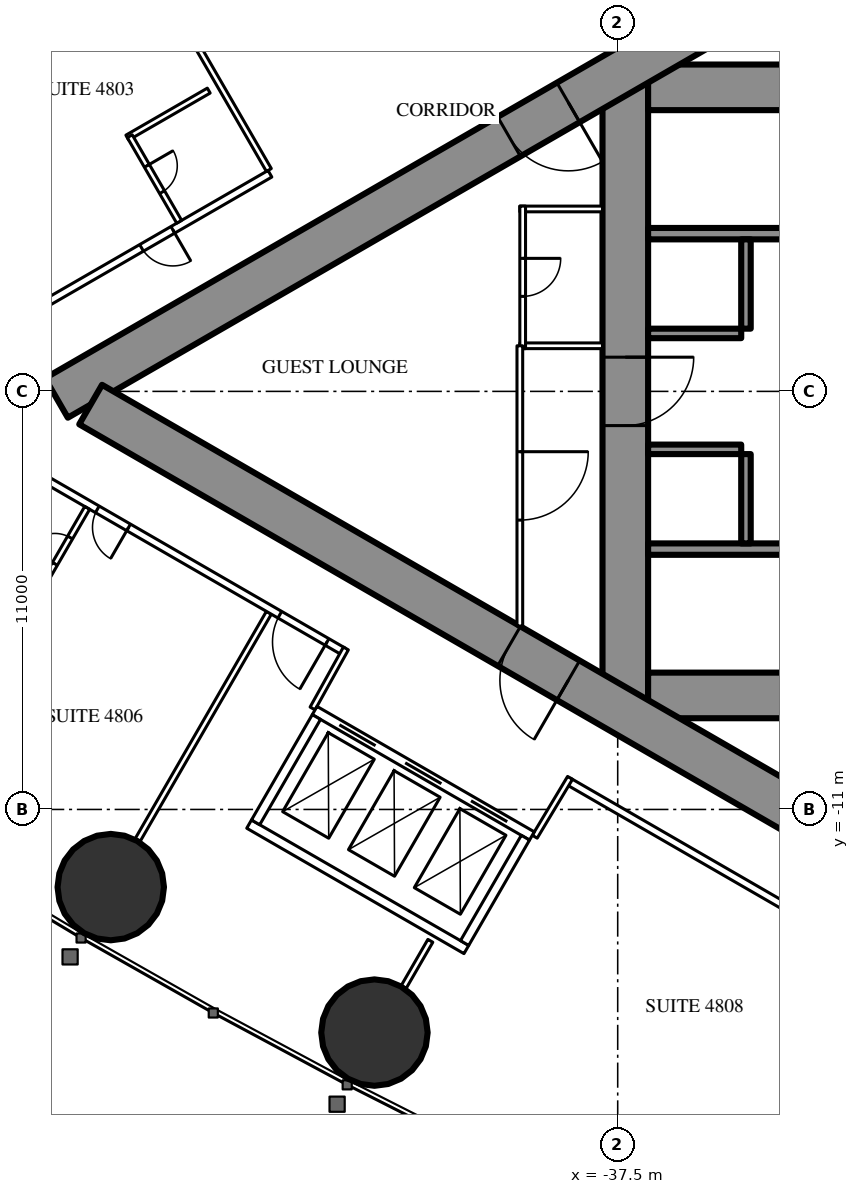
"""IFC4 building model, lengths in metres.
Left out: names, types, materials, properties, quantities, classifications, styles, units other than length and angle.
Written with IfcOpenShell. Run it as: python <this file> out.ifc"""

import sys

from ifc_helpers import new_model, si_unit, direction, frame, frame_2d, origin, origin_2d, place, context, subcontext, project, spatial, rectangle, circle, extrude, element, fill, save


model = new_model("IFC4")
c1 = context("Model", 3, precision=1e-05, world=origin(), true_north=direction((0.0, 1.0)))
c2 = subcontext(c1, "Body", "Model", "MODEL_VIEW")
j1 = project(units=[si_unit("LENGTHUNIT", "METRE"), si_unit("PLANEANGLEUNIT", "RADIAN")], contexts=[c1])
p1 = place(None, origin())
s1 = spatial("IfcSite", under=j1, at=p1, CompositionType="ELEMENT")
p2 = place(p1, origin())
s2 = spatial("IfcBuilding", under=s1, at=p2, CompositionType="ELEMENT")
p3 = place(p2, frame((0.0, 0.0, 180.8)))
s3 = spatial("IfcBuildingStorey", under=s2, at=p3, CompositionType="ELEMENT", Elevation=180.8)
for number, where, z_axis, x_axis in (
    (1, (-50.839, -13.043, 0.0), (0.0, 0.0, 1.0), (1.0, 0.0, 0.0)),
    (2, (-43.9, -16.871, 0.0), (0.0, 0.0, 1.0), (1.0, 0.0, 0.0)),
):
    element("IfcColumn", number, at=place(p3, frame(where, z_axis=z_axis, x_axis=x_axis)), inside=s3, PredefinedType="COLUMN", context=c2, shape_type="SweptSolid", body=[
        extrude(circle(Radius=1.4, at=origin_2d()), origin(), (0.0, 0.0, 1.0), 3.5),
    ])
p4 = place(p3, frame((-37.3, 8.6, 0.0), z_axis=(0.0, 0.0, 1.0), x_axis=(0.0, -1.0, 0.0)))
e3 = element("IfcWall", 3, at=p4, inside=s3, PredefinedType="SHEAR", context=c2, shape_type="SweptSolid", body=[
    extrude(rectangle(XDim=17.2, YDim=1.2, at=frame_2d((8.6, 0.0))), origin(), (0.0, 0.0, 1.0), 3.5),
])
p5 = place(p4, frame((7.7, 0.0, 0.0)))
e4 = element("IfcOpeningElement", 4, at=p5, cuts=e3, PredefinedType="OPENING", context=c2, shape_type="SweptSolid", body=[
    extrude(rectangle(XDim=1.8, YDim=2.2, at=frame_2d((0.9, 1.1))), frame((0.0, 0.61, 0.0), z_axis=(0.0, -1.0, 0.0), x_axis=(1.0, 0.0, 0.0)), (0.0, 0.0, 1.0), 1.22),
])
p6 = place(p3, frame((-28.3, 8.0, 0.0), z_axis=(0.0, 0.0, 1.0), x_axis=(-1.0, 0.0, 0.0)))
e5 = element("IfcWall", 5, at=p6, inside=s3, PredefinedType="SHEAR", context=c2, shape_type="SweptSolid", body=[
    extrude(rectangle(XDim=8.4, YDim=1.2, at=frame_2d((4.2, 0.0))), origin(), (0.0, 0.0, 1.0), 3.5),
])
p7 = place(p6, frame((0.25, 0.0, 0.0)))
e6 = element("IfcOpeningElement", 6, at=p7, cuts=e5, PredefinedType="OPENING", context=c2, shape_type="SweptSolid", body=[
    extrude(rectangle(XDim=1.0, YDim=2.2, at=frame_2d((0.5, 1.1))), frame((0.0, 0.61, 0.0), z_axis=(0.0, -1.0, 0.0), x_axis=(1.0, 0.0, 0.0)), (0.0, 0.0, 1.0), 1.22),
])
p8 = place(p3, frame((-28.3, -8.0, 0.0), z_axis=(0.0, 0.0, 1.0), x_axis=(-1.0, 0.0, 0.0)))
e7 = element("IfcWall", 7, at=p8, inside=s3, PredefinedType="SHEAR", context=c2, shape_type="SweptSolid", body=[
    extrude(rectangle(XDim=8.4, YDim=1.2, at=frame_2d((4.2, 0.0))), origin(), (0.0, 0.0, 1.0), 3.5),
])
p9 = place(p8, frame((0.25, 0.0, 0.0)))
e8 = element("IfcOpeningElement", 8, at=p9, cuts=e7, PredefinedType="OPENING", context=c2, shape_type="SweptSolid", body=[
    extrude(rectangle(XDim=1.0, YDim=2.2, at=frame_2d((0.5, 1.1))), frame((0.0, 0.61, 0.0), z_axis=(0.0, -1.0, 0.0), x_axis=(1.0, 0.0, 0.0)), (0.0, 0.0, 1.0), 1.22),
])
for number, where, z_axis, x_axis in (
    (9, (-28.3, 4.15, 0.0), (0.0, 0.0, 1.0), (-1.0, 0.0, 0.0)),
    (10, (-28.3, -4.15, 0.0), (0.0, 0.0, 1.0), (-1.0, 0.0, 0.0)),
):
    element("IfcWall", number, at=place(p3, frame(where, z_axis=z_axis, x_axis=x_axis)), inside=s3, PredefinedType="SHEAR", context=c2, shape_type="SweptSolid", body=[
        extrude(rectangle(XDim=8.4, YDim=0.3, at=frame_2d((4.2, 0.0))), origin(), (0.0, 0.0, 1.0), 3.5),
    ])
p10 = place(p3, frame((-34.125, 4.0, 0.0), z_axis=(0.0, 0.0, 1.0), x_axis=(0.0, -1.0, 0.0)))
e11 = element("IfcWall", 11, at=p10, inside=s3, PredefinedType="SHEAR", context=c2, shape_type="SweptSolid", body=[
    extrude(rectangle(XDim=2.35, YDim=0.25, at=frame_2d((1.175, 0.0))), origin(), (0.0, 0.0, 1.0), 3.5),
])
p11 = place(p3, frame((-34.25, 1.525, 0.0), z_axis=(0.0, 0.0, 1.0), x_axis=(-1.0, 0.0, 0.0)))
e12 = element("IfcWall", 12, at=p11, inside=s3, PredefinedType="SHEAR", context=c2, shape_type="SweptSolid", body=[
    extrude(rectangle(XDim=2.45, YDim=0.25, at=frame_2d((1.225, 0.0))), origin(), (0.0, 0.0, 1.0), 3.5),
])
p12 = place(p3, frame((-34.125, -1.65, 0.0), z_axis=(0.0, 0.0, 1.0), x_axis=(0.0, -1.0, 0.0)))
e13 = element("IfcWall", 13, at=p12, inside=s3, PredefinedType="SHEAR", context=c2, shape_type="SweptSolid", body=[
    extrude(rectangle(XDim=2.35, YDim=0.25, at=frame_2d((1.175, 0.0))), origin(), (0.0, 0.0, 1.0), 3.5),
])
p13 = place(p3, frame((-34.25, -1.525, 0.0), z_axis=(0.0, 0.0, 1.0), x_axis=(-1.0, 0.0, 0.0)))
e14 = element("IfcWall", 14, at=p13, inside=s3, PredefinedType="SHEAR", context=c2, shape_type="SweptSolid", body=[
    extrude(rectangle(XDim=2.45, YDim=0.25, at=frame_2d((1.225, 0.0))), origin(), (0.0, 0.0, 1.0), 3.5),
])
p14 = place(p3, frame((-27.2, 14.3, 0.0), z_axis=(0.0, 0.0, 1.0), x_axis=(-0.866026593062, -0.499997940104, 0.0)))
e15 = element("IfcWall", 15, at=p14, inside=s3, PredefinedType="SHEAR", context=c2, shape_type="SweptSolid", body=[
    extrude(rectangle(XDim=28.946, YDim=1.2, at=frame_2d((14.473, 0.0))), origin(), (0.0, 0.0, 1.0), 3.5),
])
p15 = place(p14, frame((4.6, 0.0, 0.0)))
e16 = element("IfcOpeningElement", 16, at=p15, cuts=e15, PredefinedType="OPENING", context=c2, shape_type="SweptSolid", body=[
    extrude(rectangle(XDim=1.0, YDim=2.2, at=frame_2d((0.5, 1.1))), frame((0.0, 0.61, 0.0), z_axis=(0.0, -1.0, 0.0), x_axis=(1.0, 0.0, 0.0)), (0.0, 0.0, 1.0), 1.22),
])
p16 = place(p14, frame((13.395, 0.0, 0.0)))
e17 = element("IfcOpeningElement", 17, at=p16, cuts=e15, PredefinedType="OPENING", context=c2, shape_type="SweptSolid", body=[
    extrude(rectangle(XDim=1.8, YDim=2.2, at=frame_2d((0.9, 1.1))), frame((0.0, 0.61, 0.0), z_axis=(0.0, -1.0, 0.0), x_axis=(1.0, 0.0, 0.0)), (0.0, 0.0, 1.0), 1.22),
])
p17 = place(p3, frame((-27.2, -14.3, 0.0), z_axis=(0.0, 0.0, 1.0), x_axis=(-0.866024021859, 0.500002393557, 0.0)))
e18 = element("IfcWall", 18, at=p17, inside=s3, PredefinedType="SHEAR", context=c2, shape_type="SweptSolid", body=[
    extrude(rectangle(XDim=27.907, YDim=1.2, at=frame_2d((13.954, 0.0))), origin(), (0.0, 0.0, 1.0), 3.5),
])
p18 = place(p17, frame((4.6, 0.0, 0.0)))
e19 = element("IfcOpeningElement", 19, at=p18, cuts=e18, PredefinedType="OPENING", context=c2, shape_type="SweptSolid", body=[
    extrude(rectangle(XDim=1.0, YDim=2.2, at=frame_2d((0.5, 1.1))), frame((0.0, 0.61, 0.0), z_axis=(0.0, -1.0, 0.0), x_axis=(1.0, 0.0, 0.0)), (0.0, 0.0, 1.0), 1.22),
])
p19 = place(p17, frame((13.395, 0.0, 0.0)))
e20 = element("IfcOpeningElement", 20, at=p19, cuts=e18, PredefinedType="OPENING", context=c2, shape_type="SweptSolid", body=[
    extrude(rectangle(XDim=1.8, YDim=2.2, at=frame_2d((0.9, 1.1))), frame((0.0, 0.61, 0.0), z_axis=(0.0, -1.0, 0.0), x_axis=(1.0, 0.0, 0.0)), (0.0, 0.0, 1.0), 1.22),
])
for number, where, z_axis, x_axis in (
    (21, (-46.679, 5.825, 0.0), (0.0, 0.0, 1.0), (-0.5, 0.866, 0.0)),
    (22, (-46.679, -5.825, 0.0), (0.0, 0.0, 1.0), (-0.5, -0.866, 0.0)),
):
    element("IfcWall", number, at=place(p3, frame(where, z_axis=z_axis, x_axis=x_axis)), inside=s3, PredefinedType="PARTITIONING", context=c2, shape_type="SweptSolid", body=[
        extrude(rectangle(XDim=6.911, YDim=0.15, at=frame_2d((3.456, 0.0))), origin(), (0.0, 0.0, 1.0), 2.3),
    ])
p20 = place(p3, frame((-42.429, -14.457, 0.0), z_axis=(0.0, 0.0, 1.0), x_axis=(-0.5000578829, -0.865991982497, 0.0)))
e23 = element("IfcWall", 23, at=p20, inside=s3, PredefinedType="PARTITIONING", context=c2, shape_type="SweptSolid", body=[
    extrude(rectangle(XDim=1.407, YDim=0.15, at=frame_2d((0.704, 0.0))), origin(), (0.0, 0.0, 1.0), 3.25),
])
p21 = place(p3, frame((-27.86, -16.575, 0.0), z_axis=(0.0, 0.0, 1.0), x_axis=(-0.866027756871, 0.499995924312, 0.0)))
e24 = element("IfcWall", 24, at=p21, inside=s3, PredefinedType="PARTITIONING", context=c2, shape_type="SweptSolid", body=[
    extrude(rectangle(XDim=12.622, YDim=0.2, at=frame_2d((6.311, 0.0))), origin(), (0.0, 0.0, 1.0), 3.25),
])
p22 = place(p21, frame((3.75, 0.0, 0.0)))
e25 = element("IfcOpeningElement", 25, at=p22, cuts=e24, PredefinedType="OPENING", context=c2, shape_type="SweptSolid", body=[
    extrude(rectangle(XDim=0.95, YDim=2.2, at=frame_2d((0.475, 1.1))), frame((0.0, 0.11, 0.0), z_axis=(0.0, -1.0, 0.0), x_axis=(1.0, 0.0, 0.0)), (0.0, 0.0, 1.0), 0.22),
])
p23 = place(p3, frame((-44.715, -6.844, 0.0), z_axis=(0.0, 0.0, 1.0), x_axis=(-0.866025261224, 0.500000246922, 0.0)))
e26 = element("IfcWall", 26, at=p23, inside=s3, PredefinedType="PARTITIONING", context=c2, shape_type="SweptSolid", body=[
    extrude(rectangle(XDim=13.567, YDim=0.2, at=frame_2d((6.783, 0.0))), origin(), (0.0, 0.0, 1.0), 3.25),
])
p24 = place(p23, frame((10.579, 0.0, 0.0)))
e27 = element("IfcOpeningElement", 27, at=p24, cuts=e26, PredefinedType="OPENING", context=c2, shape_type="SweptSolid", body=[
    extrude(rectangle(XDim=0.95, YDim=2.2, at=frame_2d((0.475, 1.1))), frame((0.0, 0.11, 0.0), z_axis=(0.0, -1.0, 0.0), x_axis=(1.0, 0.0, 0.0)), (0.0, 0.0, 1.0), 0.22),
])
p25 = place(p23, frame((6.529, 0.0, 0.0)))
e28 = element("IfcOpeningElement", 28, at=p25, cuts=e26, PredefinedType="OPENING", context=c2, shape_type="SweptSolid", body=[
    extrude(rectangle(XDim=0.95, YDim=2.2, at=frame_2d((0.475, 1.1))), frame((0.0, 0.11, 0.0), z_axis=(0.0, -1.0, 0.0), x_axis=(1.0, 0.0, 0.0)), (0.0, 0.0, 1.0), 0.22),
])
p26 = place(p23, frame((0.5, 0.0, 0.0)))
e29 = element("IfcOpeningElement", 29, at=p26, cuts=e26, PredefinedType="OPENING", context=c2, shape_type="SweptSolid", body=[
    extrude(rectangle(XDim=1.435, YDim=2.2, at=frame_2d((0.718, 1.1))), frame((0.0, 0.11, 0.0), z_axis=(0.0, -1.0, 0.0), x_axis=(1.0, 0.0, 0.0)), (0.0, 0.0, 1.0), 0.22),
])
for number, where, z_axis, x_axis in (
    (30, (-39.683, -11.718, 0.0), (0.0, 0.0, 1.0), (0.514, 0.858, 0.0)),
    (31, (-44.652, -6.764, 0.0), (0.0, 0.0, 1.0), (-0.485, -0.874, 0.0)),
):
    element("IfcWall", number, at=place(p3, frame(where, z_axis=z_axis, x_axis=x_axis)), inside=s3, PredefinedType="PARTITIONING", context=c2, shape_type="SweptSolid", body=[
        extrude(rectangle(XDim=1.805, YDim=0.15, at=frame_2d((0.903, 0.0))), origin(), (0.0, 0.0, 1.0), 3.25),
    ])
p27 = place(p3, frame((-46.65, 5.726, 0.0), z_axis=(0.0, 0.0, 1.0), x_axis=(-0.866027963864, -0.499995565786, 0.0)))
e32 = element("IfcWall", 32, at=p27, inside=s3, PredefinedType="PARTITIONING", context=c2, shape_type="SweptSolid", body=[
    extrude(rectangle(XDim=11.452, YDim=0.2, at=frame_2d((5.726, 0.0))), origin(), (0.0, 0.0, 1.0), 3.25),
])
p28 = place(p27, frame((2.95, 0.0, 0.0)))
e33 = element("IfcOpeningElement", 33, at=p28, cuts=e32, PredefinedType="OPENING", context=c2, shape_type="SweptSolid", body=[
    extrude(rectangle(XDim=0.95, YDim=2.2, at=frame_2d((0.475, 1.1))), frame((0.0, 0.11, 0.0), z_axis=(0.0, -1.0, 0.0), x_axis=(1.0, 0.0, 0.0)), (0.0, 0.0, 1.0), 0.22),
])
p29 = place(p27, frame((8.344, 0.0, 0.0)))
e34 = element("IfcOpeningElement", 34, at=p29, cuts=e32, PredefinedType="OPENING", context=c2, shape_type="SweptSolid", body=[
    extrude(rectangle(XDim=0.95, YDim=2.2, at=frame_2d((0.475, 1.1))), frame((0.0, 0.11, 0.0), z_axis=(0.0, -1.0, 0.0), x_axis=(1.0, 0.0, 0.0)), (0.0, 0.0, 1.0), 0.22),
])
p30 = place(p3, frame((-48.26, 7.914, 0.0), z_axis=(0.0, 0.0, 1.0), x_axis=(-0.866031185235, -0.4999899861, 0.0)))
e35 = element("IfcWall", 35, at=p30, inside=s3, PredefinedType="PARTITIONING", context=c2, shape_type="SweptSolid", body=[
    extrude(rectangle(XDim=2.475, YDim=0.15, at=frame_2d((1.238, 0.0))), origin(), (0.0, 0.0, 1.0), 3.25),
])
p31 = place(p3, frame((-49.039, 4.463, 0.0), z_axis=(0.0, 0.0, 1.0), x_axis=(-0.499936506574, 0.866062058628, 0.0)))
e36 = element("IfcWall", 36, at=p31, inside=s3, PredefinedType="PARTITIONING", context=c2, shape_type="SweptSolid", body=[
    extrude(rectangle(XDim=2.6, YDim=0.15, at=frame_2d((1.3, 0.0))), origin(), (0.0, 0.0, 1.0), 3.25),
])
p32 = place(p31, frame((0.9, 0.0, 0.0)))
e37 = element("IfcOpeningElement", 37, at=p32, cuts=e36, PredefinedType="OPENING", context=c2, shape_type="SweptSolid", body=[
    extrude(rectangle(XDim=0.8, YDim=2.2, at=frame_2d((0.4, 1.1))), frame((0.0, 0.085, 0.0), z_axis=(0.0, -1.0, 0.0), x_axis=(1.0, 0.0, 0.0)), (0.0, 0.0, 1.0), 0.17),
])
p33 = place(p3, frame((-51.459, -3.065, 0.0), z_axis=(0.0, 0.0, 1.0), x_axis=(-0.499936506574, -0.866062058628, 0.0)))
e38 = element("IfcWall", 38, at=p33, inside=s3, PredefinedType="PARTITIONING", context=c2, shape_type="SweptSolid", body=[
    extrude(rectangle(XDim=2.6, YDim=0.15, at=frame_2d((1.3, 0.0))), origin(), (0.0, 0.0, 1.0), 3.25),
])
p34 = place(p33, frame((0.9, 0.0, 0.0)))
e39 = element("IfcOpeningElement", 39, at=p34, cuts=e38, PredefinedType="OPENING", context=c2, shape_type="SweptSolid", body=[
    extrude(rectangle(XDim=0.8, YDim=2.2, at=frame_2d((0.4, 1.1))), frame((0.0, 0.085, 0.0), z_axis=(0.0, -1.0, 0.0), x_axis=(1.0, 0.0, 0.0)), (0.0, 0.0, 1.0), 0.17),
])
for number, where, z_axis, x_axis in (
    (40, (-37.9, 1.2, 0.0), (0.0, 0.0, 1.0), (-1.0, 0.0, 0.0)),
    (41, (-37.9, 4.8, 0.0), (0.0, 0.0, 1.0), (-1.0, 0.0, 0.0)),
):
    element("IfcWall", number, at=place(p3, frame(where, z_axis=z_axis, x_axis=x_axis)), inside=s3, PredefinedType="PARTITIONING", context=c2, shape_type="SweptSolid", body=[
        extrude(rectangle(XDim=2.175, YDim=0.15, at=frame_2d((1.087, 0.0))), origin(), (0.0, 0.0, 1.0), 3.25),
    ])
p35 = place(p3, frame((-40.0, 4.875, 0.0), z_axis=(0.0, 0.0, 1.0), x_axis=(0.0, -1.0, 0.0)))
e42 = element("IfcWall", 42, at=p35, inside=s3, PredefinedType="PARTITIONING", context=c2, shape_type="SweptSolid", body=[
    extrude(rectangle(XDim=3.75, YDim=0.15, at=frame_2d((1.875, 0.0))), origin(), (0.0, 0.0, 1.0), 3.25),
])
p36 = place(p35, frame((1.375, 0.0, 0.0)))
e43 = element("IfcOpeningElement", 43, at=p36, cuts=e42, PredefinedType="OPENING", context=c2, shape_type="SweptSolid", body=[
    extrude(rectangle(XDim=1.0, YDim=2.2, at=frame_2d((0.5, 1.1))), frame((0.0, 0.085, 0.0), z_axis=(0.0, -1.0, 0.0), x_axis=(1.0, 0.0, 0.0)), (0.0, 0.0, 1.0), 0.17),
])
p37 = place(p3, frame((-40.075, 1.2, 0.0), z_axis=(0.0, 0.0, 1.0), x_axis=(0.0, -1.0, 0.0)))
e44 = element("IfcWall", 44, at=p37, inside=s3, PredefinedType="PARTITIONING", context=c2, shape_type="SweptSolid", body=[
    extrude(rectangle(XDim=7.374, YDim=0.15, at=frame_2d((3.687, 0.0))), origin(), (0.0, 0.0, 1.0), 3.25),
])
p38 = place(p37, frame((2.787, 0.0, 0.0)))
e45 = element("IfcOpeningElement", 45, at=p38, cuts=e44, PredefinedType="OPENING", context=c2, shape_type="SweptSolid", body=[
    extrude(rectangle(XDim=1.8, YDim=2.2, at=frame_2d((0.9, 1.1))), frame((0.0, 0.085, 0.0), z_axis=(0.0, -1.0, 0.0), x_axis=(1.0, 0.0, 0.0)), (0.0, 0.0, 1.0), 0.17),
])
p39 = place(p3, frame((-39.758, -11.697, 0.0), z_axis=(0.0, 0.0, 1.0), x_axis=(-0.866024194504, 0.500002094529, 0.0)))
e46 = element("IfcWall", 46, at=p39, inside=s3, PredefinedType="PARTITIONING", context=c2, shape_type="SweptSolid", body=[
    extrude(rectangle(XDim=6.6, YDim=0.25, at=frame_2d((3.3, 0.0))), origin(), (0.0, 0.0, 1.0), 3.25),
])
p40 = place(p39, frame((0.75, 0.0, 0.0)))
e47 = element("IfcOpeningElement", 47, at=p40, cuts=e46, PredefinedType="OPENING", context=c2, shape_type="SweptSolid", body=[
    extrude(rectangle(XDim=1.1, YDim=2.2, at=frame_2d((0.55, 1.1))), frame((0.0, 0.135, 0.0), z_axis=(0.0, -1.0, 0.0), x_axis=(1.0, 0.0, 0.0)), (0.0, 0.0, 1.0), 0.27),
])
p41 = place(p39, frame((2.75, 0.0, 0.0)))
e48 = element("IfcOpeningElement", 48, at=p41, cuts=e46, PredefinedType="OPENING", context=c2, shape_type="SweptSolid", body=[
    extrude(rectangle(XDim=1.1, YDim=2.2, at=frame_2d((0.55, 1.1))), frame((0.0, 0.135, 0.0), z_axis=(0.0, -1.0, 0.0), x_axis=(1.0, 0.0, 0.0)), (0.0, 0.0, 1.0), 0.27),
])
p42 = place(p39, frame((4.75, 0.0, 0.0)))
e49 = element("IfcOpeningElement", 49, at=p42, cuts=e46, PredefinedType="OPENING", context=c2, shape_type="SweptSolid", body=[
    extrude(rectangle(XDim=1.1, YDim=2.2, at=frame_2d((0.55, 1.1))), frame((0.0, 0.135, 0.0), z_axis=(0.0, -1.0, 0.0), x_axis=(1.0, 0.0, 0.0)), (0.0, 0.0, 1.0), 0.27),
])
p43 = place(p3, frame((-41.482, -14.686, 0.0), z_axis=(0.0, 0.0, 1.0), x_axis=(-0.86603344179, 0.499986077507, 0.0)))
e50 = element("IfcWall", 50, at=p43, inside=s3, PredefinedType="PARTITIONING", context=c2, shape_type="SweptSolid", body=[
    extrude(rectangle(XDim=6.6, YDim=0.25, at=frame_2d((3.3, 0.0))), origin(), (0.0, 0.0, 1.0), 3.25),
])
for number, where, z_axis, x_axis in (
    (51, (-39.928, -11.743, 0.0), (0.0, 0.0, 1.0), (-0.5, -0.866, 0.0)),
    (52, (-45.428, -8.568, 0.0), (0.0, 0.0, 1.0), (-0.5, -0.866, 0.0)),
):
    element("IfcWall", number, at=place(p3, frame(where, z_axis=z_axis, x_axis=x_axis)), inside=s3, PredefinedType="PARTITIONING", context=c2, shape_type="SweptSolid", body=[
        extrude(rectangle(XDim=3.201, YDim=0.25, at=frame_2d((1.6, 0.0))), origin(), (0.0, 0.0, 1.0), 3.25),
    ])
p44 = place(p32, origin())
e53 = element("IfcDoor", 53, at=p44, inside=s3, OperationType="SINGLE_SWING_RIGHT", PredefinedType="DOOR", context=c2, shape_type="SweptSolid", body=[
    extrude(rectangle(XDim=0.8, YDim=2.2, at=frame_2d((0.4, 1.1))), frame((0.0, 0.025, 0.0), z_axis=(0.0, -1.0, 0.0), x_axis=(1.0, 0.0, 0.0)), (0.0, 0.0, 1.0), 0.05),
])
fill(e37, e53)
p45 = place(p28, origin())
e54 = element("IfcDoor", 54, at=p45, inside=s3, OperationType="SINGLE_SWING_LEFT", PredefinedType="DOOR", context=c2, shape_type="SweptSolid", body=[
    extrude(rectangle(XDim=0.95, YDim=2.2, at=frame_2d((0.475, 1.1))), frame((0.0, 0.025, 0.0), z_axis=(0.0, -1.0, 0.0), x_axis=(1.0, 0.0, 0.0)), (0.0, 0.0, 1.0), 0.05),
])
fill(e33, e54)
p46 = place(p34, origin())
e55 = element("IfcDoor", 55, at=p46, inside=s3, OperationType="SINGLE_SWING_RIGHT", PredefinedType="DOOR", context=c2, shape_type="SweptSolid", body=[
    extrude(rectangle(XDim=0.8, YDim=2.2, at=frame_2d((0.4, 1.1))), frame((0.0, 0.025, 0.0), z_axis=(0.0, -1.0, 0.0), x_axis=(1.0, 0.0, 0.0)), (0.0, 0.0, 1.0), 0.05),
])
fill(e39, e55)
p47 = place(p25, origin())
e56 = element("IfcDoor", 56, at=p47, inside=s3, OperationType="SINGLE_SWING_LEFT", PredefinedType="DOOR", context=c2, shape_type="SweptSolid", body=[
    extrude(rectangle(XDim=0.95, YDim=2.2, at=frame_2d((0.475, 1.1))), frame((0.0, 0.025, 0.0), z_axis=(0.0, -1.0, 0.0), x_axis=(1.0, 0.0, 0.0)), (0.0, 0.0, 1.0), 0.05),
])
fill(e28, e56)
p48 = place(p26, origin())
e57 = element("IfcDoor", 57, at=p48, inside=s3, OperationType="SINGLE_SWING_LEFT", PredefinedType="DOOR", context=c2, shape_type="SweptSolid", body=[
    extrude(rectangle(XDim=1.435, YDim=2.2, at=frame_2d((0.718, 1.1))), frame((0.0, 0.025, 0.0), z_axis=(0.0, -1.0, 0.0), x_axis=(1.0, 0.0, 0.0)), (0.0, 0.0, 1.0), 0.05),
])
fill(e29, e57)
p49 = place(p36, origin())
e58 = element("IfcDoor", 58, at=p49, inside=s3, OperationType="SINGLE_SWING_LEFT", PredefinedType="DOOR", context=c2, shape_type="SweptSolid", body=[
    extrude(rectangle(XDim=1.0, YDim=2.2, at=frame_2d((0.5, 1.1))), frame((0.0, 0.025, 0.0), z_axis=(0.0, -1.0, 0.0), x_axis=(1.0, 0.0, 0.0)), (0.0, 0.0, 1.0), 0.05),
])
fill(e43, e58)
p50 = place(p38, origin())
e59 = element("IfcDoor", 59, at=p50, inside=s3, OperationType="DOUBLE_DOOR_SINGLE_SWING", PredefinedType="DOOR", context=c2, shape_type="SweptSolid", body=[
    extrude(rectangle(XDim=1.8, YDim=2.2, at=frame_2d((0.9, 1.1))), frame((0.0, 0.025, 0.0), z_axis=(0.0, -1.0, 0.0), x_axis=(1.0, 0.0, 0.0)), (0.0, 0.0, 1.0), 0.05),
])
fill(e45, e59)
p51 = place(p16, origin())
e60 = element("IfcDoor", 60, at=p51, inside=s3, OperationType="DOUBLE_DOOR_SINGLE_SWING", PredefinedType="DOOR", context=c2, shape_type="SweptSolid", body=[
    extrude(rectangle(XDim=1.8, YDim=2.2, at=frame_2d((0.9, 1.1))), frame((0.0, 0.025, 0.0), z_axis=(0.0, -1.0, 0.0), x_axis=(1.0, 0.0, 0.0)), (0.0, 0.0, 1.0), 0.05),
])
fill(e17, e60)
p52 = place(p19, origin())
e61 = element("IfcDoor", 61, at=p52, inside=s3, OperationType="DOUBLE_DOOR_SINGLE_SWING", PredefinedType="DOOR", context=c2, shape_type="SweptSolid", body=[
    extrude(rectangle(XDim=1.8, YDim=2.2, at=frame_2d((0.9, 1.1))), frame((0.0, 0.025, 0.0), z_axis=(0.0, -1.0, 0.0), x_axis=(1.0, 0.0, 0.0)), (0.0, 0.0, 1.0), 0.05),
])
fill(e20, e61)
p53 = place(p5, origin())
e62 = element("IfcDoor", 62, at=p53, inside=s3, OperationType="DOUBLE_DOOR_SINGLE_SWING", PredefinedType="DOOR", context=c2, shape_type="SweptSolid", body=[
    extrude(rectangle(XDim=1.8, YDim=2.2, at=frame_2d((0.9, 1.1))), frame((0.0, 0.025, 0.0), z_axis=(0.0, -1.0, 0.0), x_axis=(1.0, 0.0, 0.0)), (0.0, 0.0, 1.0), 0.05),
])
fill(e4, e62)
p54 = place(p40, origin())
e63 = element("IfcDoor", 63, at=p54, inside=s3, OperationType="DOUBLE_DOOR_SLIDING", PredefinedType="USERDEFINED", context=c2, shape_type="SweptSolid", body=[
    extrude(rectangle(XDim=1.1, YDim=2.2, at=frame_2d((0.55, 1.1))), frame((0.0, 0.025, 0.0), z_axis=(0.0, -1.0, 0.0), x_axis=(1.0, 0.0, 0.0)), (0.0, 0.0, 1.0), 0.05),
])
fill(e47, e63)
p55 = place(p41, origin())
e64 = element("IfcDoor", 64, at=p55, inside=s3, OperationType="DOUBLE_DOOR_SLIDING", PredefinedType="USERDEFINED", context=c2, shape_type="SweptSolid", body=[
    extrude(rectangle(XDim=1.1, YDim=2.2, at=frame_2d((0.55, 1.1))), frame((0.0, 0.025, 0.0), z_axis=(0.0, -1.0, 0.0), x_axis=(1.0, 0.0, 0.0)), (0.0, 0.0, 1.0), 0.05),
])
fill(e48, e64)
p56 = place(p42, origin())
e65 = element("IfcDoor", 65, at=p56, inside=s3, OperationType="DOUBLE_DOOR_SLIDING", PredefinedType="USERDEFINED", context=c2, shape_type="SweptSolid", body=[
    extrude(rectangle(XDim=1.1, YDim=2.2, at=frame_2d((0.55, 1.1))), frame((0.0, 0.025, 0.0), z_axis=(0.0, -1.0, 0.0), x_axis=(1.0, 0.0, 0.0)), (0.0, 0.0, 1.0), 0.05),
])
fill(e49, e65)
save(model, sys.argv[1])
